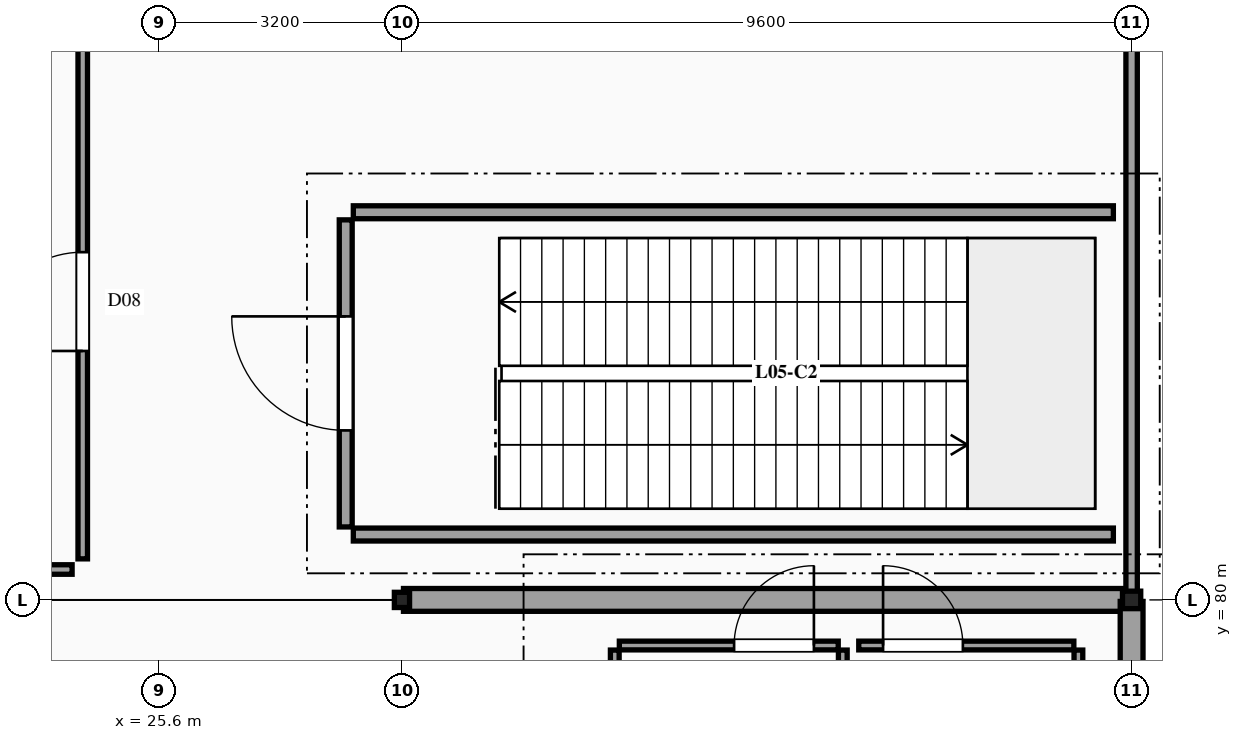
"""IFC4 building model, lengths in metres.
Left out: names, types, materials, properties, quantities, classifications, styles, units other than length and angle.
Written with IfcOpenShell. Run it as: python <this file> out.ifc"""

import sys

from ifc_helpers import new_model, si_unit, direction, frame, frame_2d, origin, origin_2d, place, context, subcontext, project, spatial, rectangle, i_section, extrude, element, fill, save


model = new_model("IFC4")
c1 = context("Model", 3, precision=1e-05, world=origin(), true_north=direction((0.0, 1.0)))
c2 = subcontext(c1, "Body", "Model", "MODEL_VIEW")
j1 = project(units=[si_unit("LENGTHUNIT", "METRE"), si_unit("PLANEANGLEUNIT", "RADIAN")], contexts=[c1])
p1 = place(None, origin())
s1 = spatial("IfcSite", under=j1, at=p1, CompositionType="ELEMENT")
p2 = place(p1, origin())
s2 = spatial("IfcBuilding", under=s1, at=p2, CompositionType="ELEMENT")
p3 = place(p2, frame((0.0, 0.0, 25.8)))
s3 = spatial("IfcBuildingStorey", under=s2, at=p3, CompositionType="ELEMENT", Elevation=25.8)
p4 = place(p3, frame((28.8, 80.0, -0.26), z_axis=(0.0, 0.0, 1.0), x_axis=(1.0, 0.0, 0.0)))
e1 = element("IfcColumn", 1, at=p4, inside=s3, PredefinedType="COLUMN", context=c2, shape_type="SweptSolid", body=[
    extrude(i_section(OverallWidth=0.2, OverallDepth=0.2, WebThickness=0.009, FlangeThickness=0.015, FilletRadius=0.018, at=origin_2d()), origin(), (0.0, 0.0, 1.0), 3.11),
])
p5 = place(p3, frame((38.4, 80.0, -0.26), z_axis=(0.0, 0.0, 1.0), x_axis=(1.0, 0.0, 0.0)))
e2 = element("IfcColumn", 2, at=p5, inside=s3, PredefinedType="COLUMN", context=c2, shape_type="SweptSolid", body=[
    extrude(i_section(OverallWidth=0.24, OverallDepth=0.23, WebThickness=0.008, FlangeThickness=0.012, FilletRadius=0.021, at=origin_2d()), origin(), (0.0, 0.0, 1.0), 3.11),
])
p6 = place(p3, frame((28.82, 80.0, 0.0), z_axis=(0.0, 0.0, 1.0), x_axis=(1.0, 0.0, 0.0)))
e3 = element("IfcWall", 3, at=p6, inside=s3, PredefinedType="SOLIDWALL", context=c2, shape_type="SweptSolid", body=[
    extrude(rectangle(XDim=9.56, YDim=0.3, at=frame_2d((4.78, 0.0))), origin(), (0.0, 0.0, 1.0), 1.25),
])
p7 = place(p3, frame((38.4, 72.02, 0.0), z_axis=(0.0, 0.0, 1.0), x_axis=(0.0, 1.0, 0.0)))
e4 = element("IfcWall", 4, at=p7, inside=s3, PredefinedType="SOLIDWALL", context=c2, shape_type="SweptSolid", body=[
    extrude(rectangle(XDim=7.96, YDim=0.3, at=frame_2d((3.98, 0.0))), origin(), (0.0, 0.0, 1.0), 0.75),
])
p8 = place(p3, frame((38.4, 80.02, 0.0), z_axis=(0.0, 0.0, 1.0), x_axis=(0.0, 1.0, 0.0)))
e5 = element("IfcWall", 5, at=p8, inside=s3, PredefinedType="SOLIDWALL", context=c2, shape_type="SweptSolid", body=[
    extrude(rectangle(XDim=7.96, YDim=0.15, at=frame_2d((3.98, 0.0))), origin(), (0.0, 0.0, 1.0), 2.45),
])
p9 = place(p3, frame((28.06, 80.96, 0.0), z_axis=(0.0, 0.0, 1.0), x_axis=(0.0, 1.0, 0.0)))
e6 = element("IfcWall", 6, at=p9, inside=s3, PredefinedType="SOLIDWALL", context=c2, shape_type="SweptSolid", body=[
    extrude(rectangle(XDim=4.04, YDim=0.17, at=frame_2d((2.02, 0.0))), origin(), (0.0, 0.0, 1.0), 2.35),
])
p10 = place(p9, frame((1.27, 0.0, 0.0)))
e7 = element("IfcOpeningElement", 7, at=p10, cuts=e6, PredefinedType="OPENING", context=c2, shape_type="SweptSolid", body=[
    extrude(rectangle(XDim=1.5, YDim=2.2, at=frame_2d((0.75, 1.1))), frame((0.0, 0.095, 0.0), z_axis=(0.0, -1.0, 0.0), x_axis=(1.0, 0.0, 0.0)), (0.0, 0.0, 1.0), 0.19),
])
for number, where, z_axis, x_axis in (
    (8, (28.16, 80.86, 0.0), (0.0, 0.0, 1.0), (1.0, 0.0, 0.0)),
    (9, (28.16, 85.1, 0.0), (0.0, 0.0, 1.0), (1.0, 0.0, 0.0)),
):
    element("IfcWall", number, at=place(p3, frame(where, z_axis=z_axis, x_axis=x_axis)), inside=s3, PredefinedType="SOLIDWALL", context=c2, shape_type="SweptSolid", body=[
        extrude(rectangle(XDim=10.0, YDim=0.17, at=frame_2d((5.0, 0.0))), origin(), (0.0, 0.0, 1.0), 2.35),
    ])
p11 = place(p3, frame((10.14, 80.4, 0.0), z_axis=(0.0, 0.0, 1.0), x_axis=(1.0, 0.0, 0.0)))
e10 = element("IfcWall", 10, at=p11, inside=s3, PredefinedType="PARTITIONING", context=c2, shape_type="SweptSolid", body=[
    extrude(rectangle(XDim=14.32, YDim=0.125, at=frame_2d((7.16, 0.0))), origin(), (0.0, 0.0, 1.0), 2.35),
])
p12 = place(p3, frame((24.6, 80.54, 0.0), z_axis=(0.0, 0.0, 1.0), x_axis=(0.0, 1.0, 0.0)))
e11 = element("IfcWall", 11, at=p12, inside=s3, PredefinedType="PARTITIONING", context=c2, shape_type="SweptSolid", body=[
    extrude(rectangle(XDim=14.92, YDim=0.125, at=frame_2d((7.46, 0.0))), origin(), (0.0, 0.0, 1.0), 2.35),
])
p13 = place(p12, frame((2.735, 0.0, 0.0)))
e12 = element("IfcOpeningElement", 12, at=p13, cuts=e11, PredefinedType="OPENING", context=c2, shape_type="SweptSolid", body=[
    extrude(rectangle(XDim=1.3, YDim=2.25, at=frame_2d((0.65, 1.125))), frame((0.0, 0.073, 0.0), z_axis=(0.0, -1.0, 0.0), x_axis=(1.0, 0.0, 0.0)), (0.0, 0.0, 1.0), 0.145),
])
p14 = place(p3, frame((31.66, 79.4, 0.0), z_axis=(0.0, 0.0, 1.0), x_axis=(1.0, 0.0, 0.0)))
e13 = element("IfcWall", 13, at=p14, inside=s3, PredefinedType="PARTITIONING", context=c2, shape_type="SweptSolid", body=[
    extrude(rectangle(XDim=2.88, YDim=0.115, at=frame_2d((1.44, 0.0))), origin(), (0.0, 0.0, 1.0), 2.35),
])
p15 = place(p14, frame((1.51, 0.0, 0.0)))
e14 = element("IfcOpeningElement", 14, at=p15, cuts=e13, PredefinedType="OPENING", context=c2, shape_type="SweptSolid", body=[
    extrude(rectangle(XDim=1.05, YDim=2.15, at=frame_2d((0.525, 1.075))), frame((0.0, 0.067, 0.0), z_axis=(0.0, -1.0, 0.0), x_axis=(1.0, 0.0, 0.0)), (0.0, 0.0, 1.0), 0.135),
])
for number, where, z_axis, x_axis in (
    (15, (31.6, 73.66, 0.0), (0.0, 0.0, 1.0), (0.0, 1.0, 0.0)),
    (16, (34.6, 73.66, 0.0), (0.0, 0.0, 1.0), (0.0, 1.0, 0.0)),
):
    element("IfcWall", number, at=place(p3, frame(where, z_axis=z_axis, x_axis=x_axis)), inside=s3, PredefinedType="PARTITIONING", context=c2, shape_type="SweptSolid", body=[
        extrude(rectangle(XDim=5.68, YDim=0.115, at=frame_2d((2.84, 0.0))), origin(), (0.0, 0.0, 1.0), 2.35),
    ])
p16 = place(p3, frame((34.81, 79.4, 0.0), z_axis=(0.0, 0.0, 1.0), x_axis=(1.0, 0.0, 0.0)))
e17 = element("IfcWall", 17, at=p16, inside=s3, PredefinedType="PARTITIONING", context=c2, shape_type="SweptSolid", body=[
    extrude(rectangle(XDim=2.83, YDim=0.115, at=frame_2d((1.415, 0.0))), origin(), (0.0, 0.0, 1.0), 2.35),
])
p17 = place(p16, frame((0.32, 0.0, 0.0)))
e18 = element("IfcOpeningElement", 18, at=p17, cuts=e17, PredefinedType="OPENING", context=c2, shape_type="SweptSolid", body=[
    extrude(rectangle(XDim=1.05, YDim=2.15, at=frame_2d((0.525, 1.075))), frame((0.0, 0.067, 0.0), z_axis=(0.0, -1.0, 0.0), x_axis=(1.0, 0.0, 0.0)), (0.0, 0.0, 1.0), 0.135),
])
p18 = place(p3, frame((37.7, 73.66, 0.0), z_axis=(0.0, 0.0, 1.0), x_axis=(0.0, 1.0, 0.0)))
e19 = element("IfcWall", 19, at=p18, inside=s3, PredefinedType="PARTITIONING", context=c2, shape_type="SweptSolid", body=[
    extrude(rectangle(XDim=5.68, YDim=0.115, at=frame_2d((2.84, 0.0))), origin(), (0.0, 0.0, 1.0), 2.35),
])
p19 = place(p10, origin())
e20 = element("IfcDoor", 20, at=p19, inside=s3, OperationType="SINGLE_SWING_RIGHT", PredefinedType="DOOR", context=c2, shape_type="SweptSolid", body=[
    extrude(rectangle(XDim=1.5, YDim=2.2, at=frame_2d((0.75, 1.1))), frame((0.0, 0.025, 0.0), z_axis=(0.0, -1.0, 0.0), x_axis=(1.0, 0.0, 0.0)), (0.0, 0.0, 1.0), 0.05),
])
fill(e7, e20)
p20 = place(p13, origin())
e21 = element("IfcDoor", 21, at=p20, inside=s3, OperationType="SINGLE_SWING_LEFT", PredefinedType="DOOR", context=c2, shape_type="SweptSolid", body=[
    extrude(rectangle(XDim=1.3, YDim=2.25, at=frame_2d((0.65, 1.125))), frame((0.0, 0.025, 0.0), z_axis=(0.0, -1.0, 0.0), x_axis=(1.0, 0.0, 0.0)), (0.0, 0.0, 1.0), 0.05),
])
fill(e12, e21)
p21 = place(p15, origin())
e22 = element("IfcDoor", 22, at=p21, inside=s3, OperationType="SINGLE_SWING_RIGHT", PredefinedType="DOOR", context=c2, shape_type="SweptSolid", body=[
    extrude(rectangle(XDim=1.05, YDim=2.15, at=frame_2d((0.525, 1.075))), frame((0.0, 0.025, 0.0), z_axis=(0.0, -1.0, 0.0), x_axis=(1.0, 0.0, 0.0)), (0.0, 0.0, 1.0), 0.05),
])
fill(e14, e22)
p22 = place(p17, origin())
e23 = element("IfcDoor", 23, at=p22, inside=s3, OperationType="SINGLE_SWING_LEFT", PredefinedType="DOOR", context=c2, shape_type="SweptSolid", body=[
    extrude(rectangle(XDim=1.05, YDim=2.15, at=frame_2d((0.525, 1.075))), frame((0.0, 0.025, 0.0), z_axis=(0.0, -1.0, 0.0), x_axis=(1.0, 0.0, 0.0)), (0.0, 0.0, 1.0), 0.05),
])
fill(e18, e23)
save(model, sys.argv[1])
